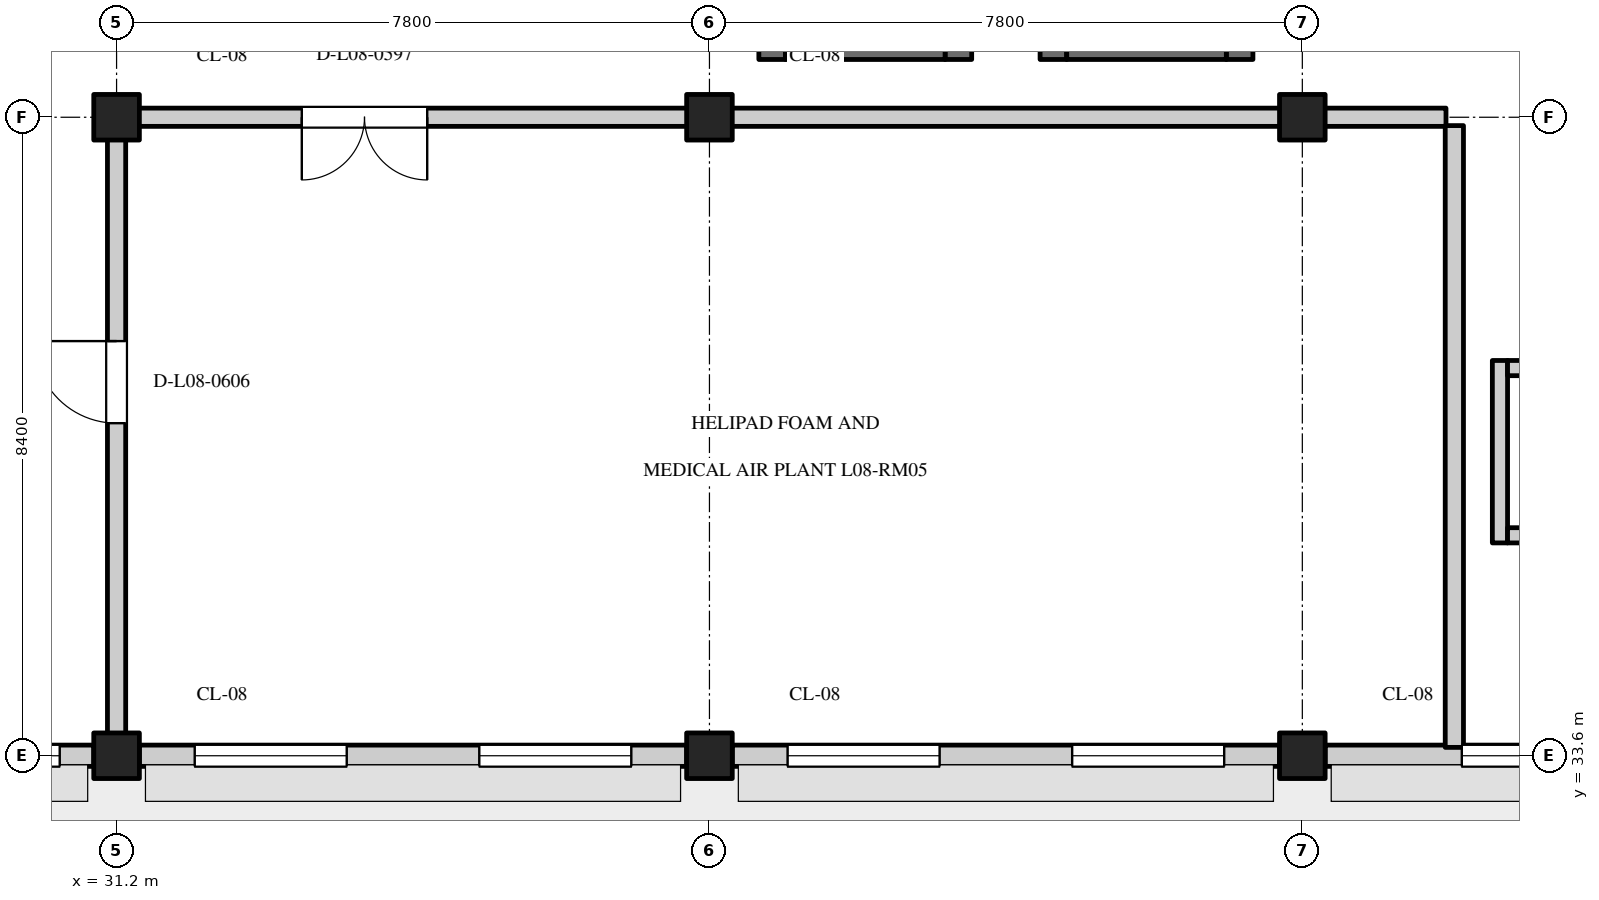
"""IFC4 building model, lengths in metres.
Left out: names, types, materials, properties, quantities, classifications, styles, units other than length and angle.
Written with IfcOpenShell. Run it as: python <this file> out.ifc"""

import sys

from ifc_helpers import new_model, si_unit, direction, frame, frame_2d, origin, origin_2d, place, context, subcontext, project, spatial, rectangle, extrude, element, fill, save


model = new_model("IFC4")
c1 = context("Model", 3, precision=1e-05, world=origin(), true_north=direction((0.0, 1.0)))
c2 = subcontext(c1, "Body", "Model", "MODEL_VIEW")
j1 = project(units=[si_unit("LENGTHUNIT", "METRE"), si_unit("PLANEANGLEUNIT", "RADIAN")], contexts=[c1])
p1 = place(None, origin())
s1 = spatial("IfcSite", under=j1, at=p1, CompositionType="ELEMENT")
p2 = place(p1, origin())
s2 = spatial("IfcBuilding", under=s1, at=p2, CompositionType="ELEMENT")
p3 = place(p2, frame((0.0, 0.0, 33.9)))
s3 = spatial("IfcBuildingStorey", under=s2, at=p3, CompositionType="ELEMENT", Elevation=33.9)
for number, where, z_axis, x_axis in (
    (1, (31.2, 33.6, 0.0), (0.0, 0.0, 1.0), (1.0, 0.0, 0.0)),
    (2, (31.2, 42.0, 0.0), (0.0, 0.0, 1.0), (1.0, 0.0, 0.0)),
    (3, (39.0, 33.6, 0.0), (0.0, 0.0, 1.0), (1.0, 0.0, 0.0)),
    (4, (39.0, 42.0, 0.0), (0.0, 0.0, 1.0), (1.0, 0.0, 0.0)),
    (5, (46.8, 33.6, 0.0), (0.0, 0.0, 1.0), (1.0, 0.0, 0.0)),
    (6, (46.8, 42.0, 0.0), (0.0, 0.0, 1.0), (1.0, 0.0, 0.0)),
):
    element("IfcColumn", number, at=place(p3, frame(where, z_axis=z_axis, x_axis=x_axis)), inside=s3, PredefinedType="COLUMN", context=c2, shape_type="SweptSolid", body=[
        extrude(rectangle(XDim=0.6, YDim=0.6, at=origin_2d()), origin(), (0.0, 0.0, 1.0), 3.9),
    ])
p4 = place(p3, frame((23.725, 33.6, 0.0), z_axis=(0.0, 0.0, 1.0), x_axis=(1.0, 0.0, 0.0)))
e7 = element("IfcWall", 7, at=p4, inside=s3, PredefinedType="STANDARD", context=c2, shape_type="SweptSolid", body=[
    extrude(rectangle(XDim=7.175, YDim=0.28, at=frame_2d((3.587, 0.0))), origin(), (0.0, 0.0, 1.0), 2.95),
])
p5 = place(p4, frame((0.983, 0.0, 0.8)))
e8 = element("IfcOpeningElement", 8, at=p5, cuts=e7, PredefinedType="OPENING", context=c2, shape_type="SweptSolid", body=[
    extrude(rectangle(XDim=2.0, YDim=1.75, at=frame_2d((1.0, 0.875))), frame((0.0, 0.152, 0.0), z_axis=(0.0, -1.0, 0.0), x_axis=(1.0, 0.0, 0.0)), (0.0, 0.0, 1.0), 0.304),
])
p6 = place(p4, frame((4.727, 0.0, 0.8)))
e9 = element("IfcOpeningElement", 9, at=p6, cuts=e7, PredefinedType="OPENING", context=c2, shape_type="SweptSolid", body=[
    extrude(rectangle(XDim=2.0, YDim=1.75, at=frame_2d((1.0, 0.875))), frame((0.0, 0.152, 0.0), z_axis=(0.0, -1.0, 0.0), x_axis=(1.0, 0.0, 0.0)), (0.0, 0.0, 1.0), 0.304),
])
p7 = place(p3, frame((31.5, 33.6, 0.0), z_axis=(0.0, 0.0, 1.0), x_axis=(1.0, 0.0, 0.0)))
e10 = element("IfcWall", 10, at=p7, inside=s3, PredefinedType="STANDARD", context=c2, shape_type="SweptSolid", body=[
    extrude(rectangle(XDim=7.2, YDim=0.28, at=frame_2d((3.6, 0.0))), origin(), (0.0, 0.0, 1.0), 2.95),
])
p8 = place(p7, frame((0.728, 0.0, 0.8)))
e11 = element("IfcOpeningElement", 11, at=p8, cuts=e10, PredefinedType="OPENING", context=c2, shape_type="SweptSolid", body=[
    extrude(rectangle(XDim=2.0, YDim=1.65, at=frame_2d((1.0, 0.825))), frame((0.0, 0.152, 0.0), z_axis=(0.0, -1.0, 0.0), x_axis=(1.0, 0.0, 0.0)), (0.0, 0.0, 1.0), 0.304),
])
p9 = place(p7, frame((4.472, 0.0, 0.8)))
e12 = element("IfcOpeningElement", 12, at=p9, cuts=e10, PredefinedType="OPENING", context=c2, shape_type="SweptSolid", body=[
    extrude(rectangle(XDim=2.0, YDim=1.65, at=frame_2d((1.0, 0.825))), frame((0.0, 0.152, 0.0), z_axis=(0.0, -1.0, 0.0), x_axis=(1.0, 0.0, 0.0)), (0.0, 0.0, 1.0), 0.304),
])
p10 = place(p3, frame((39.3, 33.6, 0.0), z_axis=(0.0, 0.0, 1.0), x_axis=(1.0, 0.0, 0.0)))
e13 = element("IfcWall", 13, at=p10, inside=s3, PredefinedType="STANDARD", context=c2, shape_type="SweptSolid", body=[
    extrude(rectangle(XDim=7.2, YDim=0.28, at=frame_2d((3.6, 0.0))), origin(), (0.0, 0.0, 1.0), 2.95),
])
p11 = place(p10, frame((0.728, 0.0, 0.8)))
e14 = element("IfcOpeningElement", 14, at=p11, cuts=e13, PredefinedType="OPENING", context=c2, shape_type="SweptSolid", body=[
    extrude(rectangle(XDim=2.0, YDim=1.55, at=frame_2d((1.0, 0.775))), frame((0.0, 0.152, 0.0), z_axis=(0.0, -1.0, 0.0), x_axis=(1.0, 0.0, 0.0)), (0.0, 0.0, 1.0), 0.304),
])
p12 = place(p10, frame((4.472, 0.0, 0.8)))
e15 = element("IfcOpeningElement", 15, at=p12, cuts=e13, PredefinedType="OPENING", context=c2, shape_type="SweptSolid", body=[
    extrude(rectangle(XDim=2.0, YDim=1.55, at=frame_2d((1.0, 0.775))), frame((0.0, 0.152, 0.0), z_axis=(0.0, -1.0, 0.0), x_axis=(1.0, 0.0, 0.0)), (0.0, 0.0, 1.0), 0.304),
])
p13 = place(p3, frame((47.1, 33.6, 0.0), z_axis=(0.0, 0.0, 1.0), x_axis=(1.0, 0.0, 0.0)))
e16 = element("IfcWall", 16, at=p13, inside=s3, PredefinedType="STANDARD", context=c2, shape_type="SweptSolid", body=[
    extrude(rectangle(XDim=7.175, YDim=0.28, at=frame_2d((3.587, 0.0))), origin(), (0.0, 0.0, 1.0), 2.95),
])
p14 = place(p13, frame((1.798, 0.0, 0.8)))
e17 = element("IfcOpeningElement", 17, at=p14, cuts=e16, PredefinedType="OPENING", context=c2, shape_type="SweptSolid", body=[
    extrude(rectangle(XDim=0.9, YDim=1.3, at=frame_2d((0.45, 0.65))), frame((0.0, 0.152, 0.0), z_axis=(0.0, -1.0, 0.0), x_axis=(1.0, 0.0, 0.0)), (0.0, 0.0, 1.0), 0.304),
])
p15 = place(p13, frame((4.472, 0.0, 0.8)))
e18 = element("IfcOpeningElement", 18, at=p15, cuts=e16, PredefinedType="OPENING", context=c2, shape_type="SweptSolid", body=[
    extrude(rectangle(XDim=2.0, YDim=1.45, at=frame_2d((1.0, 0.725))), frame((0.0, 0.152, 0.0), z_axis=(0.0, -1.0, 0.0), x_axis=(1.0, 0.0, 0.0)), (0.0, 0.0, 1.0), 0.304),
])
for number, where, z_axis, x_axis in (
    (19, (39.825, 42.76, 0.0), (0.0, 0.0, 1.0), (0.0, 1.0, 0.0)),
    (20, (42.275, 42.76, 0.0), (0.0, 0.0, 1.0), (0.0, 1.0, 0.0)),
):
    element("IfcWall", number, at=place(p3, frame(where, z_axis=z_axis, x_axis=x_axis)), inside=s3, PredefinedType="SHEAR", context=c2, shape_type="SweptSolid", body=[
        extrude(rectangle(XDim=4.05, YDim=0.35, at=frame_2d((2.025, 0.0))), origin(), (0.0, 0.0, 1.0), 3.6),
    ])
p16 = place(p3, frame((40.0, 42.935, 0.0), z_axis=(0.0, 0.0, 1.0), x_axis=(1.0, 0.0, 0.0)))
e21 = element("IfcWall", 21, at=p16, inside=s3, PredefinedType="SHEAR", context=c2, shape_type="SweptSolid", body=[
    extrude(rectangle(XDim=2.1, YDim=0.35, at=frame_2d((1.05, 0.0))), origin(), (0.0, 0.0, 1.0), 3.6),
])
for number, where, z_axis, x_axis in (
    (22, (43.525, 42.76, 0.0), (0.0, 0.0, 1.0), (0.0, 1.0, 0.0)),
    (23, (45.975, 42.76, 0.0), (0.0, 0.0, 1.0), (0.0, 1.0, 0.0)),
):
    element("IfcWall", number, at=place(p3, frame(where, z_axis=z_axis, x_axis=x_axis)), inside=s3, PredefinedType="SHEAR", context=c2, shape_type="SweptSolid", body=[
        extrude(rectangle(XDim=4.05, YDim=0.35, at=frame_2d((2.025, 0.0))), origin(), (0.0, 0.0, 1.0), 3.6),
    ])
p17 = place(p3, frame((43.7, 42.935, 0.0), z_axis=(0.0, 0.0, 1.0), x_axis=(1.0, 0.0, 0.0)))
e24 = element("IfcWall", 24, at=p17, inside=s3, PredefinedType="SHEAR", context=c2, shape_type="SweptSolid", body=[
    extrude(rectangle(XDim=2.1, YDim=0.35, at=frame_2d((1.05, 0.0))), origin(), (0.0, 0.0, 1.0), 3.6),
])
p18 = place(p3, frame((49.4, 36.4, 0.0), z_axis=(0.0, 0.0, 1.0), x_axis=(0.0, 1.0, 0.0)))
e25 = element("IfcWall", 25, at=p18, inside=s3, PredefinedType="STANDARD", context=c2, shape_type="SweptSolid", body=[
    extrude(rectangle(XDim=2.4, YDim=0.2, at=frame_2d((1.2, 0.0))), origin(), (0.0, 0.0, 1.0), 3.6),
])
for number, where, z_axis, x_axis in (
    (26, (49.5, 36.5, 0.0), (0.0, 0.0, 1.0), (1.0, 0.0, 0.0)),
    (27, (49.5, 38.7, 0.0), (0.0, 0.0, 1.0), (1.0, 0.0, 0.0)),
):
    element("IfcWall", number, at=place(p3, frame(where, z_axis=z_axis, x_axis=x_axis)), inside=s3, PredefinedType="STANDARD", context=c2, shape_type="SweptSolid", body=[
        extrude(rectangle(XDim=2.0, YDim=0.2, at=frame_2d((1.0, 0.0))), origin(), (0.0, 0.0, 1.0), 3.6),
    ])
p19 = place(p3, frame((31.31, 42.0, 0.0), z_axis=(0.0, 0.0, 1.0), x_axis=(1.0, 0.0, 0.0)))
e28 = element("IfcWall", 28, at=p19, inside=s3, PredefinedType="STANDARD", context=c2, shape_type="SweptSolid", body=[
    extrude(rectangle(XDim=17.38, YDim=0.24, at=frame_2d((8.69, 0.0))), origin(), (0.0, 0.0, 1.0), 3.58),
])
p20 = place(p19, frame((2.327, 0.0, 0.0)))
e29 = element("IfcOpeningElement", 29, at=p20, cuts=e28, PredefinedType="OPENING", context=c2, shape_type="SweptSolid", body=[
    extrude(rectangle(XDim=1.65, YDim=2.25, at=frame_2d((0.825, 1.125))), frame((0.0, 0.132, 0.0), z_axis=(0.0, -1.0, 0.0), x_axis=(1.0, 0.0, 0.0)), (0.0, 0.0, 1.0), 0.264),
])
for number, where, z_axis, x_axis in (
    (30, (38.74, 33.6, 0.0), (0.0, 0.0, 1.0), (1.0, 0.0, 0.0)),
    (31, (46.54, 33.6, 0.0), (0.0, 0.0, 1.0), (1.0, 0.0, 0.0)),
):
    element("IfcWall", number, at=place(p3, frame(where, z_axis=z_axis, x_axis=x_axis)), inside=s3, PredefinedType="STANDARD", context=c2, shape_type="SweptSolid", body=[
        extrude(rectangle(XDim=0.52, YDim=0.24, at=frame_2d((0.26, 0.0))), origin(), (0.0, 0.0, 1.0), 2.95),
    ])
p21 = place(p3, frame((31.2, 33.71, 0.0), z_axis=(0.0, 0.0, 1.0), x_axis=(0.0, 1.0, 0.0)))
e32 = element("IfcWall", 32, at=p21, inside=s3, PredefinedType="STANDARD", context=c2, shape_type="SweptSolid", body=[
    extrude(rectangle(XDim=8.18, YDim=0.24, at=frame_2d((4.09, 0.0))), origin(), (0.0, 0.0, 1.0), 3.58),
])
p22 = place(p21, frame((4.265, 0.0, 0.0)))
e33 = element("IfcOpeningElement", 33, at=p22, cuts=e32, PredefinedType="OPENING", context=c2, shape_type="SweptSolid", body=[
    extrude(rectangle(XDim=1.08, YDim=2.15, at=frame_2d((0.54, 1.075))), frame((0.0, 0.132, 0.0), z_axis=(0.0, -1.0, 0.0), x_axis=(1.0, 0.0, 0.0)), (0.0, 0.0, 1.0), 0.264),
])
p23 = place(p3, frame((48.8, 33.71, 0.0), z_axis=(0.0, 0.0, 1.0), x_axis=(0.0, 1.0, 0.0)))
e34 = element("IfcWall", 34, at=p23, inside=s3, PredefinedType="STANDARD", context=c2, shape_type="SweptSolid", body=[
    extrude(rectangle(XDim=8.18, YDim=0.24, at=frame_2d((4.09, 0.0))), origin(), (0.0, 0.0, 1.0), 3.58),
])
p24 = place(p6, origin())
e35 = element("IfcWindow", 35, at=p24, inside=s3, PartitioningType="DOUBLE_PANEL_VERTICAL", PredefinedType="WINDOW", context=c2, shape_type="SweptSolid", body=[
    extrude(rectangle(XDim=2.0, YDim=1.75, at=frame_2d((1.0, 0.875))), frame((0.0, 0.03, 0.0), z_axis=(0.0, -1.0, 0.0), x_axis=(1.0, 0.0, 0.0)), (0.0, 0.0, 1.0), 0.06),
])
fill(e9, e35)
p25 = place(p8, origin())
e36 = element("IfcWindow", 36, at=p25, inside=s3, PartitioningType="DOUBLE_PANEL_VERTICAL", PredefinedType="WINDOW", context=c2, shape_type="SweptSolid", body=[
    extrude(rectangle(XDim=2.0, YDim=1.65, at=frame_2d((1.0, 0.825))), frame((0.0, 0.03, 0.0), z_axis=(0.0, -1.0, 0.0), x_axis=(1.0, 0.0, 0.0)), (0.0, 0.0, 1.0), 0.06),
])
fill(e11, e36)
p26 = place(p9, origin())
e37 = element("IfcWindow", 37, at=p26, inside=s3, PartitioningType="DOUBLE_PANEL_VERTICAL", PredefinedType="WINDOW", context=c2, shape_type="SweptSolid", body=[
    extrude(rectangle(XDim=2.0, YDim=1.65, at=frame_2d((1.0, 0.825))), frame((0.0, 0.03, 0.0), z_axis=(0.0, -1.0, 0.0), x_axis=(1.0, 0.0, 0.0)), (0.0, 0.0, 1.0), 0.06),
])
fill(e12, e37)
p27 = place(p11, origin())
e38 = element("IfcWindow", 38, at=p27, inside=s3, PartitioningType="DOUBLE_PANEL_VERTICAL", PredefinedType="WINDOW", context=c2, shape_type="SweptSolid", body=[
    extrude(rectangle(XDim=2.0, YDim=1.55, at=frame_2d((1.0, 0.775))), frame((0.0, 0.03, 0.0), z_axis=(0.0, -1.0, 0.0), x_axis=(1.0, 0.0, 0.0)), (0.0, 0.0, 1.0), 0.06),
])
fill(e14, e38)
p28 = place(p12, origin())
e39 = element("IfcWindow", 39, at=p28, inside=s3, PartitioningType="DOUBLE_PANEL_VERTICAL", PredefinedType="WINDOW", context=c2, shape_type="SweptSolid", body=[
    extrude(rectangle(XDim=2.0, YDim=1.55, at=frame_2d((1.0, 0.775))), frame((0.0, 0.03, 0.0), z_axis=(0.0, -1.0, 0.0), x_axis=(1.0, 0.0, 0.0)), (0.0, 0.0, 1.0), 0.06),
])
fill(e15, e39)
p29 = place(p14, origin())
e40 = element("IfcWindow", 40, at=p29, inside=s3, PartitioningType="SINGLE_PANEL", PredefinedType="WINDOW", context=c2, shape_type="SweptSolid", body=[
    extrude(rectangle(XDim=0.9, YDim=1.3, at=frame_2d((0.45, 0.65))), frame((0.0, 0.03, 0.0), z_axis=(0.0, -1.0, 0.0), x_axis=(1.0, 0.0, 0.0)), (0.0, 0.0, 1.0), 0.06),
])
fill(e17, e40)
p30 = place(p20, frame((1.65, 0.0, 0.0), z_axis=(0.0, 0.0, 1.0), x_axis=(-1.0, 0.0, 0.0)))
e41 = element("IfcDoor", 41, at=p30, inside=s3, OperationType="DOUBLE_DOOR_SINGLE_SWING", PredefinedType="DOOR", context=c2, shape_type="SweptSolid", body=[
    extrude(rectangle(XDim=1.65, YDim=2.25, at=frame_2d((0.825, 1.125))), frame((0.0, 0.025, 0.0), z_axis=(0.0, -1.0, 0.0), x_axis=(1.0, 0.0, 0.0)), (0.0, 0.0, 1.0), 0.05),
])
fill(e29, e41)
p31 = place(p22, frame((1.08, 0.0, 0.0), z_axis=(0.0, 0.0, 1.0), x_axis=(-1.0, 0.0, 0.0)))
e42 = element("IfcDoor", 42, at=p31, inside=s3, OperationType="SINGLE_SWING_LEFT", PredefinedType="DOOR", context=c2, shape_type="SweptSolid", body=[
    extrude(rectangle(XDim=1.08, YDim=2.15, at=frame_2d((0.54, 1.075))), frame((0.0, 0.025, 0.0), z_axis=(0.0, -1.0, 0.0), x_axis=(1.0, 0.0, 0.0)), (0.0, 0.0, 1.0), 0.05),
])
fill(e33, e42)
save(model, sys.argv[1])
